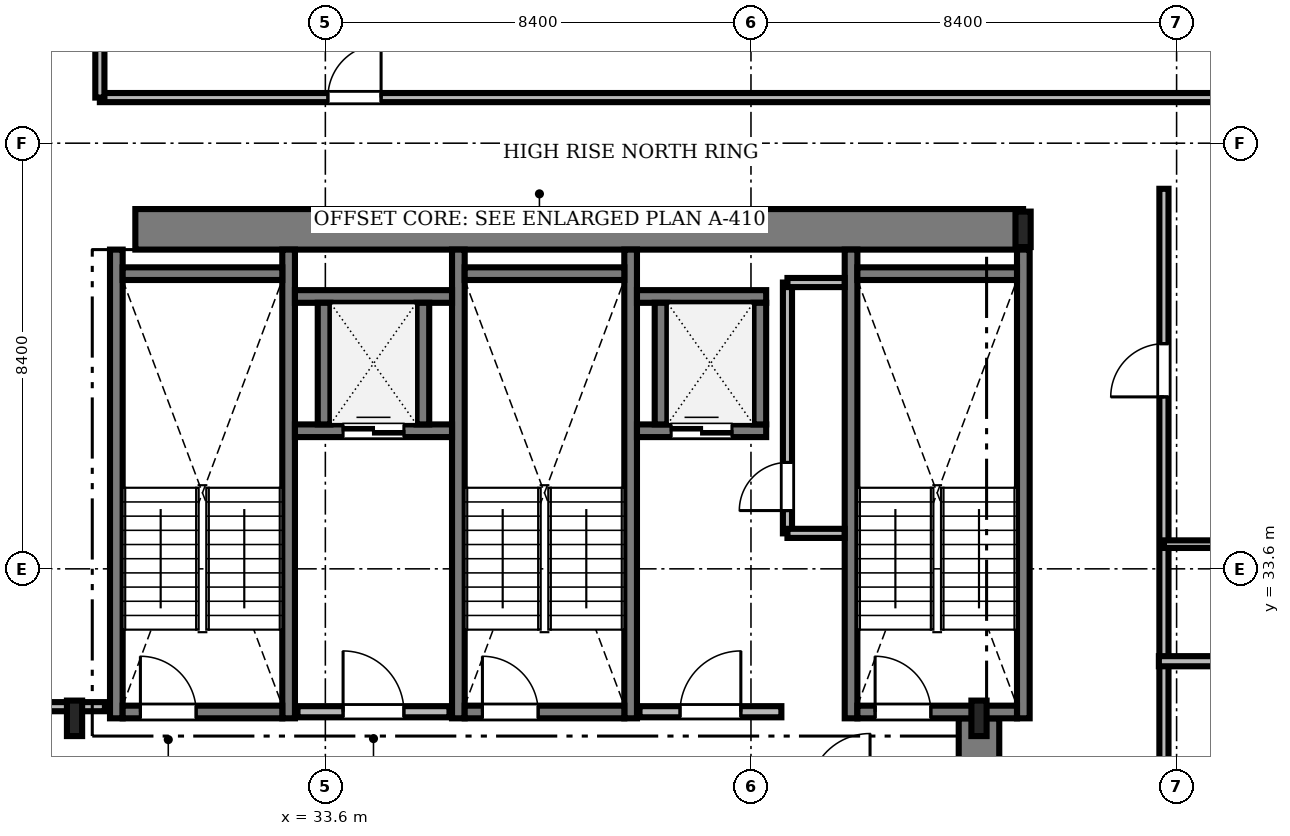
"""IFC4 building model, lengths in metres.
Left out: names, types, materials, properties, quantities, classifications, styles, units other than length and angle.
Written with IfcOpenShell. Run it as: python <this file> out.ifc"""

import sys

from ifc_helpers import new_model, si_unit, direction, frame, frame_2d, origin, origin_2d, place, context, subcontext, project, spatial, rectangle, i_section, extrude, source, transform, mapped, element, fill, save


model = new_model("IFC4")
c1 = context("Model", 3, precision=1e-05, world=origin(), true_north=direction((0.0, 1.0)))
c2 = subcontext(c1, "Body", "Model", "MODEL_VIEW")
j1 = project(units=[si_unit("LENGTHUNIT", "METRE"), si_unit("PLANEANGLEUNIT", "RADIAN")], contexts=[c1])
p1 = place(None, origin())
s1 = spatial("IfcSite", under=j1, at=p1, CompositionType="ELEMENT")
p2 = place(p1, origin())
s2 = spatial("IfcBuilding", under=s1, at=p2, CompositionType="ELEMENT")
p3 = place(p2, frame((0.0, 0.0, 192.3)))
s3 = spatial("IfcBuildingStorey", under=s2, at=p3, CompositionType="ELEMENT", Elevation=192.3)
m1 = source(origin(), c2, "Body", "SweptSolid", [
    extrude(rectangle(XDim=17.52, YDim=0.8, at=frame_2d((8.76, 0.0))), origin(), (0.0, 0.0, 1.0), 3.53),
])
p4 = place(p3, frame((29.85, 40.3, 0.0), z_axis=(0.0, 0.0, 1.0), x_axis=(1.0, 0.0, 0.0)))
e1 = element("IfcWall", 1, at=p4, inside=s3, PredefinedType="SHEAR", context=c2, shape_type="MappedRepresentation", body=[
    mapped(m1, transform((0.0, 0.0, 0.0), scale=1.0)),
])
m2 = source(origin(), c2, "Body", "SweptSolid", [
    extrude(rectangle(XDim=13.15, YDim=0.8, at=frame_2d((6.575, 0.0))), origin(), (0.0, 0.0, 1.0), 3.53),
])
p5 = place(p3, frame((46.5, 17.5, 0.0), z_axis=(0.0, 0.0, 1.0), x_axis=(0.0, 1.0, 0.0)))
e2 = element("IfcWall", 2, at=p5, inside=s3, PredefinedType="SHEAR", context=c2, shape_type="MappedRepresentation", body=[
    mapped(m2, transform((0.0, 0.0, 0.0), scale=1.0)),
])
m3 = source(origin(), c2, "Body", "SweptSolid", [
    extrude(i_section(OverallWidth=0.3, OverallDepth=0.7, WebThickness=0.017, FlangeThickness=0.032, FilletRadius=0.027, at=origin_2d()), origin(), (0.0, 0.0, 1.0), 3.53),
])
for number, where, z_axis, x_axis in (
    (3, (28.65, 30.65, 0.0), (0.0, 0.0, 1.0), (1.0, 0.0, 0.0)),
    (4, (46.5, 30.65, 0.0), (0.0, 0.0, 1.0), (1.0, 0.0, 0.0)),
    (5, (47.37, 40.3, 0.0), (0.0, 0.0, 1.0), (1.0, 0.0, 0.0)),
):
    element("IfcColumn", number, at=place(p3, frame(where, z_axis=z_axis, x_axis=x_axis)), inside=s3, PredefinedType="COLUMN", context=c2, shape_type="MappedRepresentation", body=[
        mapped(m3, transform((0.0, 0.0, 0.0), scale=1.0)),
    ])
m4 = source(origin(), c2, "Body", "SweptSolid", [
    extrude(rectangle(XDim=9.25, YDim=0.25, at=frame_2d((4.625, 0.0))), origin(), (0.0, 0.0, 1.0), 3.55),
])
for number, where, z_axis, x_axis in (
    (6, (29.475, 30.65, 0.0), (0.0, 0.0, 1.0), (0.0, 1.0, 0.0)),
    (7, (32.875, 30.65, 0.0), (0.0, 0.0, 1.0), (0.0, 1.0, 0.0)),
):
    element("IfcWall", number, at=place(p3, frame(where, z_axis=z_axis, x_axis=x_axis)), inside=s3, PredefinedType="SOLIDWALL", context=c2, shape_type="MappedRepresentation", body=[
        mapped(m4, transform((0.0, 0.0, 0.0), scale=1.0)),
    ])
m5 = source(origin(), c2, "Body", "SweptSolid", [
    extrude(rectangle(XDim=3.15, YDim=0.25, at=frame_2d((1.575, 0.0))), origin(), (0.0, 0.0, 1.0), 3.55),
])
p6 = place(p3, frame((29.6, 39.425, 0.0), z_axis=(0.0, 0.0, 1.0), x_axis=(1.0, 0.0, 0.0)))
e8 = element("IfcWall", 8, at=p6, inside=s3, PredefinedType="SOLIDWALL", context=c2, shape_type="MappedRepresentation", body=[
    mapped(m5, transform((0.0, 0.0, 0.0), scale=1.0)),
])
p7 = place(p3, frame((29.6, 30.775, 0.0), z_axis=(0.0, 0.0, 1.0), x_axis=(1.0, 0.0, 0.0)))
e9 = element("IfcWall", 9, at=p7, inside=s3, PredefinedType="SOLIDWALL", context=c2, shape_type="MappedRepresentation", body=[
    mapped(m5, transform((0.0, 0.0, 0.0), scale=1.0)),
])
m6 = source(origin(), c2, "Body", "SweptSolid", [
    extrude(rectangle(XDim=1.1, YDim=2.2, at=frame_2d((0.55, 1.1))), frame((0.0, 0.135, 0.0), z_axis=(0.0, -1.0, 0.0), x_axis=(1.0, 0.0, 0.0)), (0.0, 0.0, 1.0), 0.27),
])
p8 = place(p7, frame((0.35, 0.0, 0.0)))
e10 = element("IfcOpeningElement", 10, at=p8, cuts=e9, PredefinedType="OPENING", context=c2, shape_type="MappedRepresentation", body=[
    mapped(m6, transform((0.0, 0.0, 0.0), scale=1.0)),
])
for number, where, z_axis, x_axis in (
    (11, (36.225, 30.65, 0.0), (0.0, 0.0, 1.0), (0.0, 1.0, 0.0)),
    (12, (39.625, 30.65, 0.0), (0.0, 0.0, 1.0), (0.0, 1.0, 0.0)),
):
    element("IfcWall", number, at=place(p3, frame(where, z_axis=z_axis, x_axis=x_axis)), inside=s3, PredefinedType="SOLIDWALL", context=c2, shape_type="MappedRepresentation", body=[
        mapped(m4, transform((0.0, 0.0, 0.0), scale=1.0)),
    ])
p9 = place(p3, frame((36.35, 39.425, 0.0), z_axis=(0.0, 0.0, 1.0), x_axis=(1.0, 0.0, 0.0)))
e13 = element("IfcWall", 13, at=p9, inside=s3, PredefinedType="SOLIDWALL", context=c2, shape_type="MappedRepresentation", body=[
    mapped(m5, transform((0.0, 0.0, 0.0), scale=1.0)),
])
p10 = place(p3, frame((36.35, 30.775, 0.0), z_axis=(0.0, 0.0, 1.0), x_axis=(1.0, 0.0, 0.0)))
e14 = element("IfcWall", 14, at=p10, inside=s3, PredefinedType="SOLIDWALL", context=c2, shape_type="MappedRepresentation", body=[
    mapped(m5, transform((0.0, 0.0, 0.0), scale=1.0)),
])
p11 = place(p10, frame((0.35, 0.0, 0.0)))
e15 = element("IfcOpeningElement", 15, at=p11, cuts=e14, PredefinedType="OPENING", context=c2, shape_type="MappedRepresentation", body=[
    mapped(m6, transform((0.0, 0.0, 0.0), scale=1.0)),
])
for number, where, z_axis, x_axis in (
    (16, (43.975, 30.65, 0.0), (0.0, 0.0, 1.0), (0.0, 1.0, 0.0)),
    (17, (47.375, 30.65, 0.0), (0.0, 0.0, 1.0), (0.0, 1.0, 0.0)),
):
    element("IfcWall", number, at=place(p3, frame(where, z_axis=z_axis, x_axis=x_axis)), inside=s3, PredefinedType="SOLIDWALL", context=c2, shape_type="MappedRepresentation", body=[
        mapped(m4, transform((0.0, 0.0, 0.0), scale=1.0)),
    ])
p12 = place(p3, frame((44.1, 39.425, 0.0), z_axis=(0.0, 0.0, 1.0), x_axis=(1.0, 0.0, 0.0)))
e18 = element("IfcWall", 18, at=p12, inside=s3, PredefinedType="SOLIDWALL", context=c2, shape_type="MappedRepresentation", body=[
    mapped(m5, transform((0.0, 0.0, 0.0), scale=1.0)),
])
p13 = place(p3, frame((44.1, 30.775, 0.0), z_axis=(0.0, 0.0, 1.0), x_axis=(1.0, 0.0, 0.0)))
e19 = element("IfcWall", 19, at=p13, inside=s3, PredefinedType="SOLIDWALL", context=c2, shape_type="MappedRepresentation", body=[
    mapped(m5, transform((0.0, 0.0, 0.0), scale=1.0)),
])
p14 = place(p13, frame((0.35, 0.0, 0.0)))
e20 = element("IfcOpeningElement", 20, at=p14, cuts=e19, PredefinedType="OPENING", context=c2, shape_type="MappedRepresentation", body=[
    mapped(m6, transform((0.0, 0.0, 0.0), scale=1.0)),
])
m7 = source(origin(), c2, "Body", "SweptSolid", [
    extrude(rectangle(XDim=3.0, YDim=0.22, at=frame_2d((1.5, 0.0))), origin(), (0.0, 0.0, 1.0), 3.53),
])
p15 = place(p3, frame((33.05, 30.78, 0.0), z_axis=(0.0, 0.0, 1.0), x_axis=(1.0, 0.0, 0.0)))
e21 = element("IfcWall", 21, at=p15, inside=s3, PredefinedType="SOLIDWALL", context=c2, shape_type="MappedRepresentation", body=[
    mapped(m7, transform((0.0, 0.0, 0.0), scale=1.0)),
])
m8 = source(origin(), c2, "Body", "SweptSolid", [
    extrude(rectangle(XDim=1.2, YDim=2.2, at=frame_2d((0.6, 1.1))), frame((0.0, 0.12, 0.0), z_axis=(0.0, -1.0, 0.0), x_axis=(1.0, 0.0, 0.0)), (0.0, 0.0, 1.0), 0.24),
])
p16 = place(p15, frame((0.9, 0.0, 0.0)))
e22 = element("IfcOpeningElement", 22, at=p16, cuts=e21, PredefinedType="OPENING", context=c2, shape_type="MappedRepresentation", body=[
    mapped(m8, transform((0.0, 0.0, 0.0), scale=1.0)),
])
m9 = source(origin(), c2, "Body", "SweptSolid", [
    extrude(rectangle(XDim=2.8, YDim=0.22, at=frame_2d((1.4, 0.0))), origin(), (0.0, 0.0, 1.0), 3.53),
])
p17 = place(p3, frame((39.8, 30.78, 0.0), z_axis=(0.0, 0.0, 1.0), x_axis=(1.0, 0.0, 0.0)))
e23 = element("IfcWall", 23, at=p17, inside=s3, PredefinedType="SOLIDWALL", context=c2, shape_type="MappedRepresentation", body=[
    mapped(m9, transform((0.0, 0.0, 0.0), scale=1.0)),
])
p18 = place(p17, frame((0.8, 0.0, 0.0)))
e24 = element("IfcOpeningElement", 24, at=p18, cuts=e23, PredefinedType="OPENING", context=c2, shape_type="MappedRepresentation", body=[
    mapped(m8, transform((0.0, 0.0, 0.0), scale=1.0)),
])
m10 = source(origin(), c2, "Body", "SweptSolid", [
    extrude(rectangle(XDim=3.1, YDim=0.25, at=frame_2d((1.55, 0.0))), origin(), (0.0, 0.0, 1.0), 3.53),
])
p19 = place(p3, frame((33.0, 36.325, 0.0), z_axis=(0.0, 0.0, 1.0), x_axis=(1.0, 0.0, 0.0)))
e25 = element("IfcWall", 25, at=p19, inside=s3, PredefinedType="SOLIDWALL", context=c2, shape_type="MappedRepresentation", body=[
    mapped(m10, transform((0.0, 0.0, 0.0), scale=1.0)),
])
m11 = source(origin(), c2, "Body", "SweptSolid", [
    extrude(rectangle(XDim=1.2, YDim=2.25, at=frame_2d((0.6, 1.125))), frame((0.0, 0.135, 0.0), z_axis=(0.0, -1.0, 0.0), x_axis=(1.0, 0.0, 0.0)), (0.0, 0.0, 1.0), 0.27),
])
p20 = place(p19, frame((0.95, 0.0, 0.0)))
e26 = element("IfcOpeningElement", 26, at=p20, cuts=e25, PredefinedType="OPENING", context=c2, shape_type="MappedRepresentation", body=[
    mapped(m11, transform((0.0, 0.0, 0.0), scale=1.0)),
])
p21 = place(p3, frame((33.0, 38.975, 0.0), z_axis=(0.0, 0.0, 1.0), x_axis=(1.0, 0.0, 0.0)))
e27 = element("IfcWall", 27, at=p21, inside=s3, PredefinedType="SOLIDWALL", context=c2, shape_type="MappedRepresentation", body=[
    mapped(m10, transform((0.0, 0.0, 0.0), scale=1.0)),
])
m12 = source(origin(), c2, "Body", "SweptSolid", [
    extrude(rectangle(XDim=2.4, YDim=0.25, at=frame_2d((1.2, 0.0))), origin(), (0.0, 0.0, 1.0), 3.53),
])
for number, where, z_axis, x_axis in (
    (28, (33.575, 36.45, 0.0), (0.0, 0.0, 1.0), (0.0, 1.0, 0.0)),
    (29, (35.525, 36.45, 0.0), (0.0, 0.0, 1.0), (0.0, 1.0, 0.0)),
):
    element("IfcWall", number, at=place(p3, frame(where, z_axis=z_axis, x_axis=x_axis)), inside=s3, PredefinedType="SOLIDWALL", context=c2, shape_type="MappedRepresentation", body=[
        mapped(m12, transform((0.0, 0.0, 0.0), scale=1.0)),
    ])
m13 = source(origin(), c2, "Body", "SweptSolid", [
    extrude(rectangle(XDim=2.55, YDim=0.25, at=frame_2d((1.275, 0.0))), origin(), (0.0, 0.0, 1.0), 3.53),
])
p22 = place(p3, frame((39.75, 36.325, 0.0), z_axis=(0.0, 0.0, 1.0), x_axis=(1.0, 0.0, 0.0)))
e30 = element("IfcWall", 30, at=p22, inside=s3, PredefinedType="SOLIDWALL", context=c2, shape_type="MappedRepresentation", body=[
    mapped(m13, transform((0.0, 0.0, 0.0), scale=1.0)),
])
p23 = place(p22, frame((0.675, 0.0, 0.0)))
e31 = element("IfcOpeningElement", 31, at=p23, cuts=e30, PredefinedType="OPENING", context=c2, shape_type="MappedRepresentation", body=[
    mapped(m11, transform((0.0, 0.0, 0.0), scale=1.0)),
])
p24 = place(p3, frame((39.75, 38.975, 0.0), z_axis=(0.0, 0.0, 1.0), x_axis=(1.0, 0.0, 0.0)))
e32 = element("IfcWall", 32, at=p24, inside=s3, PredefinedType="SOLIDWALL", context=c2, shape_type="MappedRepresentation", body=[
    mapped(m13, transform((0.0, 0.0, 0.0), scale=1.0)),
])
for number, where, z_axis, x_axis in (
    (33, (40.225, 36.45, 0.0), (0.0, 0.0, 1.0), (0.0, 1.0, 0.0)),
    (34, (42.175, 36.45, 0.0), (0.0, 0.0, 1.0), (0.0, 1.0, 0.0)),
):
    element("IfcWall", number, at=place(p3, frame(where, z_axis=z_axis, x_axis=x_axis)), inside=s3, PredefinedType="SOLIDWALL", context=c2, shape_type="MappedRepresentation", body=[
        mapped(m12, transform((0.0, 0.0, 0.0), scale=1.0)),
    ])
m14 = source(origin(), c2, "Body", "SweptSolid", [
    extrude(rectangle(XDim=28.428, YDim=0.18, at=frame_2d((14.214, 0.0))), origin(), (0.0, 0.0, 1.0), 2.772),
])
p25 = place(p3, frame((29.15, 42.9, 0.0), z_axis=(0.0, 0.0, 1.0), x_axis=(1.0, 0.0, 0.0)))
e35 = element("IfcWall", 35, at=p25, inside=s3, PredefinedType="PARTITIONING", context=c2, shape_type="MappedRepresentation", body=[
    mapped(m14, transform((0.0, 0.0, 0.0), scale=1.0)),
])
m15 = source(origin(), c2, "Body", "SweptSolid", [
    extrude(rectangle(XDim=1.05, YDim=2.2, at=frame_2d((0.525, 1.1))), frame((0.0, 0.1, 0.0), z_axis=(0.0, -1.0, 0.0), x_axis=(1.0, 0.0, 0.0)), (0.0, 0.0, 1.0), 0.2),
])
p26 = place(p25, frame((4.5, 0.0, 0.0)))
e36 = element("IfcOpeningElement", 36, at=p26, cuts=e35, PredefinedType="OPENING", context=c2, shape_type="MappedRepresentation", body=[
    mapped(m15, transform((0.0, 0.0, 0.0), scale=1.0)),
])
m16 = source(origin(), c2, "Body", "SweptSolid", [
    extrude(rectangle(XDim=27.53, YDim=0.18, at=frame_2d((13.765, 0.0))), origin(), (0.0, 0.0, 1.0), 2.972),
])
p27 = place(p3, frame((50.15, 13.57, 0.0), z_axis=(0.0, 0.0, 1.0), x_axis=(0.0, 1.0, 0.0)))
e37 = element("IfcWall", 37, at=p27, inside=s3, PredefinedType="PARTITIONING", context=c2, shape_type="MappedRepresentation", body=[
    mapped(m16, transform((0.0, 0.0, 0.0), scale=1.0)),
])
p28 = place(p27, frame((5.217, 0.0, 0.0)))
e38 = element("IfcOpeningElement", 38, at=p28, cuts=e37, PredefinedType="OPENING", context=c2, shape_type="MappedRepresentation", body=[
    mapped(m15, transform((0.0, 0.0, 0.0), scale=1.0)),
])
p29 = place(p27, frame((14.32, 0.0, 0.0)))
e39 = element("IfcOpeningElement", 39, at=p29, cuts=e37, PredefinedType="OPENING", context=c2, shape_type="MappedRepresentation", body=[
    mapped(m15, transform((0.0, 0.0, 0.0), scale=1.0)),
])
p30 = place(p27, frame((23.423, 0.0, 0.0)))
e40 = element("IfcOpeningElement", 40, at=p30, cuts=e37, PredefinedType="OPENING", context=c2, shape_type="MappedRepresentation", body=[
    mapped(m15, transform((0.0, 0.0, 0.0), scale=1.0)),
])
m17 = source(origin(), c2, "Body", "SweptSolid", [
    extrude(rectangle(XDim=17.828, YDim=0.18, at=frame_2d((8.914, 0.0))), origin(), (0.0, 0.0, 1.0), 2.772),
])
p31 = place(p3, frame((11.422, 30.88, 0.0), z_axis=(0.0, 0.0, 1.0), x_axis=(1.0, 0.0, 0.0)))
e41 = element("IfcWall", 41, at=p31, inside=s3, PredefinedType="PARTITIONING", context=c2, shape_type="MappedRepresentation", body=[
    mapped(m17, transform((0.0, 0.0, 0.0), scale=1.0)),
])
p32 = place(p31, frame((10.778, 0.0, 0.0)))
e42 = element("IfcOpeningElement", 42, at=p32, cuts=e41, PredefinedType="OPENING", context=c2, shape_type="MappedRepresentation", body=[
    mapped(m15, transform((0.0, 0.0, 0.0), scale=1.0)),
])
m18 = source(origin(), c2, "Body", "SweptSolid", [
    extrude(rectangle(XDim=4.95, YDim=0.18, at=frame_2d((2.475, 0.0))), origin(), (0.0, 0.0, 1.0), 3.53),
])
p33 = place(p3, frame((42.72, 34.3, 0.0), z_axis=(0.0, 0.0, 1.0), x_axis=(0.0, 1.0, 0.0)))
e43 = element("IfcWall", 43, at=p33, inside=s3, PredefinedType="PARTITIONING", context=c2, shape_type="MappedRepresentation", body=[
    mapped(m18, transform((0.0, 0.0, 0.0), scale=1.0)),
])
m19 = source(origin(), c2, "Body", "SweptSolid", [
    extrude(rectangle(XDim=0.95, YDim=2.15, at=frame_2d((0.475, 1.075))), frame((0.0, 0.1, 0.0), z_axis=(0.0, -1.0, 0.0), x_axis=(1.0, 0.0, 0.0)), (0.0, 0.0, 1.0), 0.2),
])
p34 = place(p33, frame((0.45, 0.0, 0.0)))
e44 = element("IfcOpeningElement", 44, at=p34, cuts=e43, PredefinedType="OPENING", context=c2, shape_type="MappedRepresentation", body=[
    mapped(m19, transform((0.0, 0.0, 0.0), scale=1.0)),
])
m20 = source(origin(), c2, "Body", "SweptSolid", [
    extrude(rectangle(XDim=7.528, YDim=0.2, at=frame_2d((3.764, 0.0))), origin(), (0.0, 0.0, 1.0), 2.772),
])
p35 = place(p3, frame((50.05, 31.777, 0.0), z_axis=(0.0, 0.0, 1.0), x_axis=(1.0, 0.0, 0.0)))
e45 = element("IfcWall", 45, at=p35, inside=s3, PredefinedType="PARTITIONING", context=c2, shape_type="MappedRepresentation", body=[
    mapped(m20, transform((0.0, 0.0, 0.0), scale=1.0)),
])
m21 = source(origin(), c2, "Body", "SweptSolid", [
    extrude(rectangle(XDim=5.378, YDim=0.18, at=frame_2d((2.689, 0.0))), origin(), (0.0, 0.0, 1.0), 2.772),
])
p36 = place(p3, frame((29.15, 42.9, 0.0), z_axis=(0.0, 0.0, 1.0), x_axis=(0.0, 1.0, 0.0)))
e46 = element("IfcWall", 46, at=p36, inside=s3, PredefinedType="PARTITIONING", context=c2, shape_type="MappedRepresentation", body=[
    mapped(m21, transform((0.0, 0.0, 0.0), scale=1.0)),
])
m22 = source(origin(), c2, "Body", "SweptSolid", [
    extrude(rectangle(XDim=2.36, YDim=0.15, at=frame_2d((1.18, 0.0))), origin(), (0.0, 0.0, 1.0), 3.53),
])
p37 = place(p3, frame((50.15, 34.087, 0.0), z_axis=(0.0, 0.0, 1.0), x_axis=(1.0, 0.0, 0.0)))
e47 = element("IfcWall", 47, at=p37, inside=s3, PredefinedType="PARTITIONING", context=c2, shape_type="MappedRepresentation", body=[
    mapped(m22, transform((0.0, 0.0, 0.0), scale=1.0)),
])
m23 = source(origin(), c2, "Body", "SweptSolid", [
    extrude(rectangle(XDim=1.128, YDim=0.18, at=frame_2d((0.564, 0.0))), origin(), (0.0, 0.0, 1.0), 3.53),
])
for number, where, z_axis, x_axis in (
    (48, (42.72, 34.3, 0.0), (0.0, 0.0, 1.0), (1.0, 0.0, 0.0)),
    (49, (42.72, 39.25, 0.0), (0.0, 0.0, 1.0), (1.0, 0.0, 0.0)),
):
    element("IfcWall", number, at=place(p3, frame(where, z_axis=z_axis, x_axis=x_axis)), inside=s3, PredefinedType="PARTITIONING", context=c2, shape_type="MappedRepresentation", body=[
        mapped(m23, transform((0.0, 0.0, 0.0), scale=1.0)),
    ])
m24 = source(origin(), c2, "Body", "SweptSolid", [
    extrude(rectangle(XDim=1.1, YDim=2.2, at=frame_2d((0.55, 1.1))), frame((0.0, 0.025, 0.0), z_axis=(0.0, -1.0, 0.0), x_axis=(1.0, 0.0, 0.0)), (0.0, 0.0, 1.0), 0.05),
])
p38 = place(p8, origin())
e50 = element("IfcDoor", 50, at=p38, inside=s3, OperationType="SINGLE_SWING_LEFT", PredefinedType="DOOR", context=c2, shape_type="MappedRepresentation", body=[
    mapped(m24, transform((0.0, 0.0, 0.0), scale=1.0)),
])
fill(e10, e50)
p39 = place(p11, origin())
e51 = element("IfcDoor", 51, at=p39, inside=s3, OperationType="SINGLE_SWING_LEFT", PredefinedType="DOOR", context=c2, shape_type="MappedRepresentation", body=[
    mapped(m24, transform((0.0, 0.0, 0.0), scale=1.0)),
])
fill(e15, e51)
p40 = place(p14, origin())
e52 = element("IfcDoor", 52, at=p40, inside=s3, OperationType="SINGLE_SWING_LEFT", PredefinedType="DOOR", context=c2, shape_type="MappedRepresentation", body=[
    mapped(m24, transform((0.0, 0.0, 0.0), scale=1.0)),
])
fill(e20, e52)
m25 = source(origin(), c2, "Body", "SweptSolid", [
    extrude(rectangle(XDim=1.2, YDim=2.2, at=frame_2d((0.6, 1.1))), frame((0.0, 0.025, 0.0), z_axis=(0.0, -1.0, 0.0), x_axis=(1.0, 0.0, 0.0)), (0.0, 0.0, 1.0), 0.05),
])
p41 = place(p16, origin())
e53 = element("IfcDoor", 53, at=p41, inside=s3, OperationType="SINGLE_SWING_LEFT", PredefinedType="DOOR", context=c2, shape_type="MappedRepresentation", body=[
    mapped(m25, transform((0.0, 0.0, 0.0), scale=1.0)),
])
fill(e22, e53)
p42 = place(p18, origin())
e54 = element("IfcDoor", 54, at=p42, inside=s3, OperationType="SINGLE_SWING_RIGHT", PredefinedType="DOOR", context=c2, shape_type="MappedRepresentation", body=[
    mapped(m25, transform((0.0, 0.0, 0.0), scale=1.0)),
])
fill(e24, e54)
m26 = source(origin(), c2, "Body", "SweptSolid", [
    extrude(rectangle(XDim=1.2, YDim=2.25, at=frame_2d((0.6, 1.125))), frame((0.0, 0.025, 0.0), z_axis=(0.0, -1.0, 0.0), x_axis=(1.0, 0.0, 0.0)), (0.0, 0.0, 1.0), 0.05),
])
p43 = place(p20, origin())
e55 = element("IfcDoor", 55, at=p43, inside=s3, OperationType="DOUBLE_DOOR_SLIDING", PredefinedType="DOOR", context=c2, shape_type="MappedRepresentation", body=[
    mapped(m26, transform((0.0, 0.0, 0.0), scale=1.0)),
])
fill(e26, e55)
p44 = place(p23, origin())
e56 = element("IfcDoor", 56, at=p44, inside=s3, OperationType="DOUBLE_DOOR_SLIDING", PredefinedType="DOOR", context=c2, shape_type="MappedRepresentation", body=[
    mapped(m26, transform((0.0, 0.0, 0.0), scale=1.0)),
])
fill(e31, e56)
m27 = source(origin(), c2, "Body", "SweptSolid", [
    extrude(rectangle(XDim=1.05, YDim=2.2, at=frame_2d((0.525, 1.1))), frame((0.0, 0.025, 0.0), z_axis=(0.0, -1.0, 0.0), x_axis=(1.0, 0.0, 0.0)), (0.0, 0.0, 1.0), 0.05),
])
p45 = place(p26, origin())
e57 = element("IfcDoor", 57, at=p45, inside=s3, OperationType="SINGLE_SWING_RIGHT", PredefinedType="DOOR", context=c2, shape_type="MappedRepresentation", body=[
    mapped(m27, transform((0.0, 0.0, 0.0), scale=1.0)),
])
fill(e36, e57)
p46 = place(p30, origin())
e58 = element("IfcDoor", 58, at=p46, inside=s3, OperationType="SINGLE_SWING_LEFT", PredefinedType="DOOR", context=c2, shape_type="MappedRepresentation", body=[
    mapped(m27, transform((0.0, 0.0, 0.0), scale=1.0)),
])
fill(e40, e58)
m28 = source(origin(), c2, "Body", "SweptSolid", [
    extrude(rectangle(XDim=0.95, YDim=2.15, at=frame_2d((0.475, 1.075))), frame((0.0, 0.025, 0.0), z_axis=(0.0, -1.0, 0.0), x_axis=(1.0, 0.0, 0.0)), (0.0, 0.0, 1.0), 0.05),
])
p47 = place(p34, origin())
e59 = element("IfcDoor", 59, at=p47, inside=s3, OperationType="SINGLE_SWING_LEFT", PredefinedType="DOOR", context=c2, shape_type="MappedRepresentation", body=[
    mapped(m28, transform((0.0, 0.0, 0.0), scale=1.0)),
])
fill(e44, e59)
save(model, sys.argv[1])
